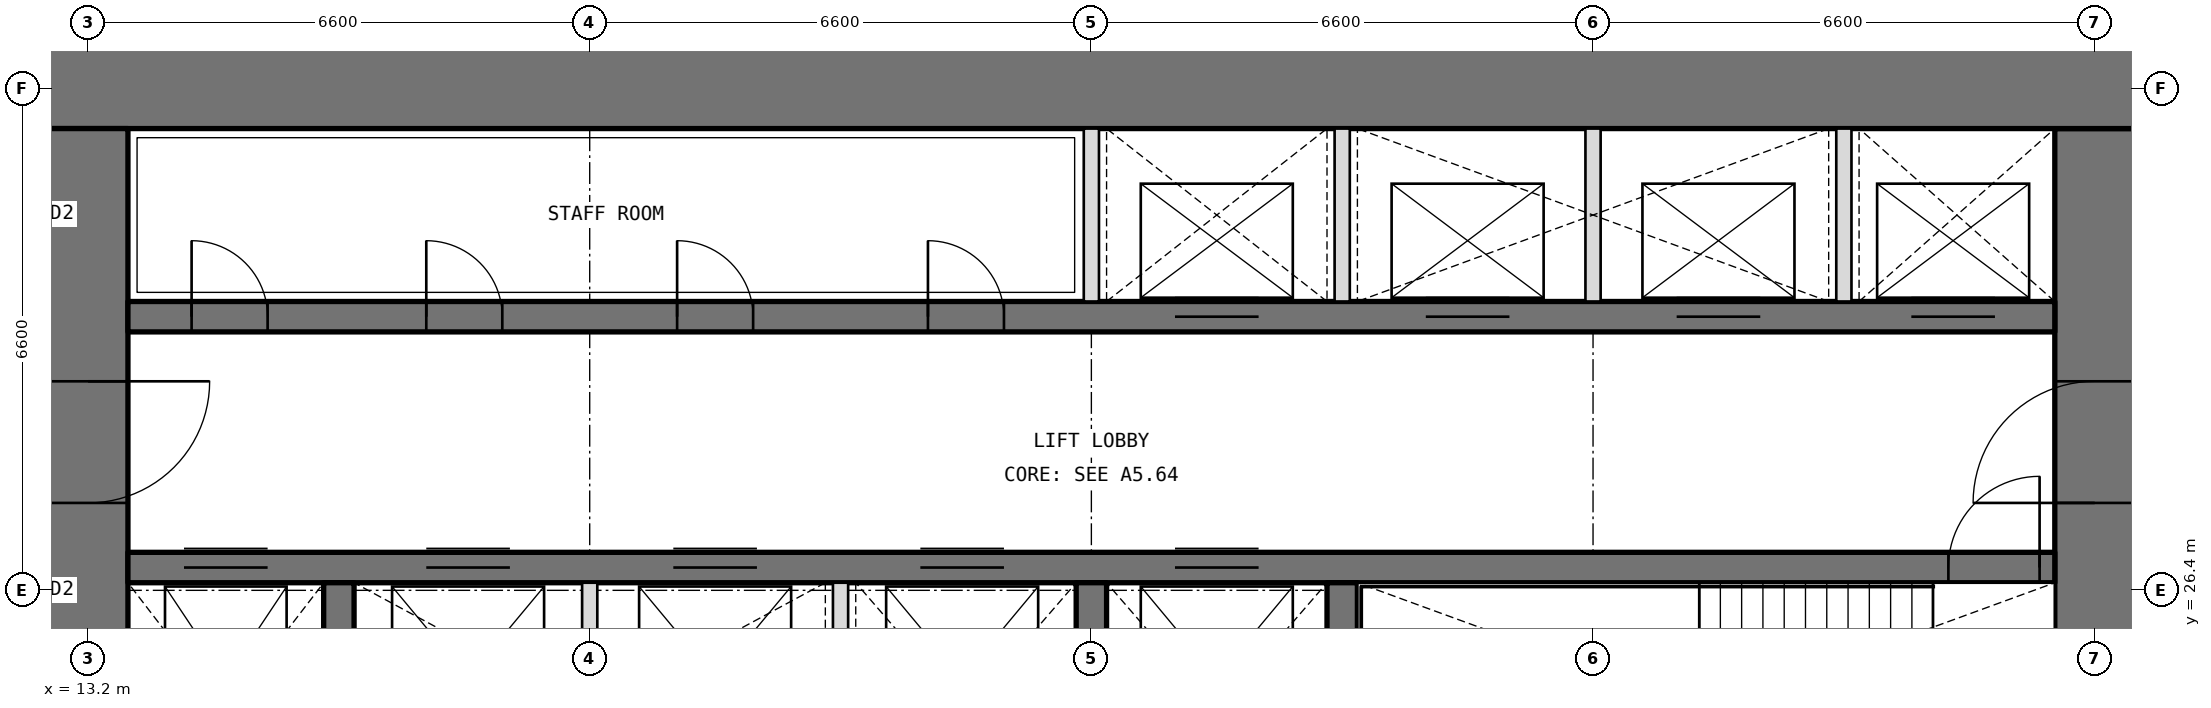
"""IFC4 building model, lengths in metres.
Left out: names, types, materials, properties, quantities, classifications, styles, units other than length and angle.
Written with IfcOpenShell. Run it as: python <this file> out.ifc"""

import sys

from ifc_helpers import new_model, si_unit, direction, frame, frame_2d, origin, place, context, subcontext, project, spatial, rectangle, extrude, element, fill, save


model = new_model("IFC4")
c1 = context("Model", 3, precision=1e-05, world=origin(), true_north=direction((0.0, 1.0)))
c2 = subcontext(c1, "Body", "Model", "MODEL_VIEW")
j1 = project(units=[si_unit("LENGTHUNIT", "METRE"), si_unit("PLANEANGLEUNIT", "RADIAN")], contexts=[c1])
p1 = place(None, origin())
s1 = spatial("IfcSite", under=j1, at=p1, CompositionType="ELEMENT")
p2 = place(p1, origin())
s2 = spatial("IfcBuilding", under=s1, at=p2, CompositionType="ELEMENT")
p3 = place(p2, frame((0.0, 0.0, 271.2)))
s3 = spatial("IfcBuildingStorey", under=s2, at=p3, CompositionType="ELEMENT", Elevation=271.2)
p4 = place(p3, frame((39.6, 13.725, 0.0), z_axis=(0.0, 0.0, 1.0), x_axis=(0.0, 1.0, 0.0)))
e1 = element("IfcWall", 1, at=p4, inside=s3, PredefinedType="SHEAR", context=c2, shape_type="SweptSolid", body=[
    extrude(rectangle(XDim=18.75, YDim=1.05, at=frame_2d((9.375, 0.0))), origin(), (0.0, 0.0, 1.0), 4.2),
])
p5 = place(p4, frame((3.025, 0.0, 0.0)))
e2 = element("IfcOpeningElement", 2, at=p5, cuts=e1, PredefinedType="OPENING", context=c2, shape_type="SweptSolid", body=[
    extrude(rectangle(XDim=1.6, YDim=2.1, at=frame_2d((0.8, 1.05))), frame((0.0, 0.535, 0.0), z_axis=(0.0, -1.0, 0.0), x_axis=(1.0, 0.0, 0.0)), (0.0, 0.0, 1.0), 1.07),
])
p6 = place(p4, frame((13.825, 0.0, 0.0)))
e3 = element("IfcOpeningElement", 3, at=p6, cuts=e1, PredefinedType="OPENING", context=c2, shape_type="SweptSolid", body=[
    extrude(rectangle(XDim=1.6, YDim=2.1, at=frame_2d((0.8, 1.05))), frame((0.0, 0.535, 0.0), z_axis=(0.0, -1.0, 0.0), x_axis=(1.0, 0.0, 0.0)), (0.0, 0.0, 1.0), 1.07),
])
p7 = place(p3, frame((40.125, 33.0, 0.0), z_axis=(0.0, 0.0, 1.0), x_axis=(-1.0, 0.0, 0.0)))
e4 = element("IfcWall", 4, at=p7, inside=s3, PredefinedType="SHEAR", context=c2, shape_type="SweptSolid", body=[
    extrude(rectangle(XDim=27.45, YDim=1.05, at=frame_2d((13.725, 0.0))), origin(), (0.0, 0.0, 1.0), 4.2),
])
p8 = place(p3, frame((13.2, 32.475, 0.0), z_axis=(0.0, 0.0, 1.0), x_axis=(0.0, -1.0, 0.0)))
e5 = element("IfcWall", 5, at=p8, inside=s3, PredefinedType="SHEAR", context=c2, shape_type="SweptSolid", body=[
    extrude(rectangle(XDim=18.75, YDim=1.05, at=frame_2d((9.375, 0.0))), origin(), (0.0, 0.0, 1.0), 4.2),
])
p9 = place(p8, frame((14.125, 0.0, 0.0)))
e6 = element("IfcOpeningElement", 6, at=p9, cuts=e5, PredefinedType="OPENING", context=c2, shape_type="SweptSolid", body=[
    extrude(rectangle(XDim=1.6, YDim=2.1, at=frame_2d((0.8, 1.05))), frame((0.0, 0.535, 0.0), z_axis=(0.0, -1.0, 0.0), x_axis=(1.0, 0.0, 0.0)), (0.0, 0.0, 1.0), 1.07),
])
p10 = place(p8, frame((3.325, 0.0, 0.0)))
e7 = element("IfcOpeningElement", 7, at=p10, cuts=e5, PredefinedType="OPENING", context=c2, shape_type="SweptSolid", body=[
    extrude(rectangle(XDim=1.6, YDim=2.1, at=frame_2d((0.8, 1.05))), frame((0.0, 0.535, 0.0), z_axis=(0.0, -1.0, 0.0), x_axis=(1.0, 0.0, 0.0)), (0.0, 0.0, 1.0), 1.07),
])
p11 = place(p3, frame((13.725, 26.7, 0.0), z_axis=(0.0, 0.0, 1.0), x_axis=(1.0, 0.0, 0.0)))
e8 = element("IfcWall", 8, at=p11, inside=s3, PredefinedType="SHEAR", context=c2, shape_type="SweptSolid", body=[
    extrude(rectangle(XDim=25.35, YDim=0.4, at=frame_2d((12.675, 0.0))), origin(), (0.0, 0.0, 1.0), 4.2),
])
p12 = place(p11, frame((23.95, 0.0, 0.0)))
e9 = element("IfcOpeningElement", 9, at=p12, cuts=e8, PredefinedType="OPENING", context=c2, shape_type="SweptSolid", body=[
    extrude(rectangle(XDim=1.2, YDim=2.1, at=frame_2d((0.6, 1.05))), frame((0.0, 0.21, 0.0), z_axis=(0.0, -1.0, 0.0), x_axis=(1.0, 0.0, 0.0)), (0.0, 0.0, 1.0), 0.42),
])
p13 = place(p11, frame((0.738, 0.0, 0.0)))
e10 = element("IfcOpeningElement", 10, at=p13, cuts=e8, PredefinedType="OPENING", context=c2, shape_type="SweptSolid", body=[
    extrude(rectangle(XDim=1.1, YDim=2.1, at=frame_2d((0.55, 1.05))), frame((0.0, 0.21, 0.0), z_axis=(0.0, -1.0, 0.0), x_axis=(1.0, 0.0, 0.0)), (0.0, 0.0, 1.0), 0.42),
])
p14 = place(p11, frame((3.925, 0.0, 0.0)))
e11 = element("IfcOpeningElement", 11, at=p14, cuts=e8, PredefinedType="OPENING", context=c2, shape_type="SweptSolid", body=[
    extrude(rectangle(XDim=1.1, YDim=2.1, at=frame_2d((0.55, 1.05))), frame((0.0, 0.21, 0.0), z_axis=(0.0, -1.0, 0.0), x_axis=(1.0, 0.0, 0.0)), (0.0, 0.0, 1.0), 0.42),
])
p15 = place(p11, frame((7.175, 0.0, 0.0)))
e12 = element("IfcOpeningElement", 12, at=p15, cuts=e8, PredefinedType="OPENING", context=c2, shape_type="SweptSolid", body=[
    extrude(rectangle(XDim=1.1, YDim=2.1, at=frame_2d((0.55, 1.05))), frame((0.0, 0.21, 0.0), z_axis=(0.0, -1.0, 0.0), x_axis=(1.0, 0.0, 0.0)), (0.0, 0.0, 1.0), 0.42),
])
p16 = place(p11, frame((10.425, 0.0, 0.0)))
e13 = element("IfcOpeningElement", 13, at=p16, cuts=e8, PredefinedType="OPENING", context=c2, shape_type="SweptSolid", body=[
    extrude(rectangle(XDim=1.1, YDim=2.1, at=frame_2d((0.55, 1.05))), frame((0.0, 0.21, 0.0), z_axis=(0.0, -1.0, 0.0), x_axis=(1.0, 0.0, 0.0)), (0.0, 0.0, 1.0), 0.42),
])
p17 = place(p11, frame((13.775, 0.0, 0.0)))
e14 = element("IfcOpeningElement", 14, at=p17, cuts=e8, PredefinedType="OPENING", context=c2, shape_type="SweptSolid", body=[
    extrude(rectangle(XDim=1.1, YDim=2.1, at=frame_2d((0.55, 1.05))), frame((0.0, 0.21, 0.0), z_axis=(0.0, -1.0, 0.0), x_axis=(1.0, 0.0, 0.0)), (0.0, 0.0, 1.0), 0.42),
])
p18 = place(p3, frame((13.725, 30.0, 0.0), z_axis=(0.0, 0.0, 1.0), x_axis=(1.0, 0.0, 0.0)))
e15 = element("IfcWall", 15, at=p18, inside=s3, PredefinedType="SHEAR", context=c2, shape_type="SweptSolid", body=[
    extrude(rectangle(XDim=25.35, YDim=0.4, at=frame_2d((12.675, 0.0))), origin(), (0.0, 0.0, 1.0), 4.2),
])
p19 = place(p18, frame((0.837, 0.0, 0.0)))
e16 = element("IfcOpeningElement", 16, at=p19, cuts=e15, PredefinedType="OPENING", context=c2, shape_type="SweptSolid", body=[
    extrude(rectangle(XDim=1.0, YDim=2.1, at=frame_2d((0.5, 1.05))), frame((0.0, 0.21, 0.0), z_axis=(0.0, -1.0, 0.0), x_axis=(1.0, 0.0, 0.0)), (0.0, 0.0, 1.0), 0.42),
])
p20 = place(p18, frame((3.925, 0.0, 0.0)))
e17 = element("IfcOpeningElement", 17, at=p20, cuts=e15, PredefinedType="OPENING", context=c2, shape_type="SweptSolid", body=[
    extrude(rectangle(XDim=1.0, YDim=2.1, at=frame_2d((0.5, 1.05))), frame((0.0, 0.21, 0.0), z_axis=(0.0, -1.0, 0.0), x_axis=(1.0, 0.0, 0.0)), (0.0, 0.0, 1.0), 0.42),
])
p21 = place(p18, frame((7.225, 0.0, 0.0)))
e18 = element("IfcOpeningElement", 18, at=p21, cuts=e15, PredefinedType="OPENING", context=c2, shape_type="SweptSolid", body=[
    extrude(rectangle(XDim=1.0, YDim=2.1, at=frame_2d((0.5, 1.05))), frame((0.0, 0.21, 0.0), z_axis=(0.0, -1.0, 0.0), x_axis=(1.0, 0.0, 0.0)), (0.0, 0.0, 1.0), 0.42),
])
p22 = place(p18, frame((10.525, 0.0, 0.0)))
e19 = element("IfcOpeningElement", 19, at=p22, cuts=e15, PredefinedType="OPENING", context=c2, shape_type="SweptSolid", body=[
    extrude(rectangle(XDim=1.0, YDim=2.1, at=frame_2d((0.5, 1.05))), frame((0.0, 0.21, 0.0), z_axis=(0.0, -1.0, 0.0), x_axis=(1.0, 0.0, 0.0)), (0.0, 0.0, 1.0), 0.42),
])
p23 = place(p18, frame((13.775, 0.0, 0.0)))
e20 = element("IfcOpeningElement", 20, at=p23, cuts=e15, PredefinedType="OPENING", context=c2, shape_type="SweptSolid", body=[
    extrude(rectangle(XDim=1.1, YDim=2.1, at=frame_2d((0.55, 1.05))), frame((0.0, 0.21, 0.0), z_axis=(0.0, -1.0, 0.0), x_axis=(1.0, 0.0, 0.0)), (0.0, 0.0, 1.0), 0.42),
])
p24 = place(p18, frame((17.075, 0.0, 0.0)))
e21 = element("IfcOpeningElement", 21, at=p24, cuts=e15, PredefinedType="OPENING", context=c2, shape_type="SweptSolid", body=[
    extrude(rectangle(XDim=1.1, YDim=2.1, at=frame_2d((0.55, 1.05))), frame((0.0, 0.21, 0.0), z_axis=(0.0, -1.0, 0.0), x_axis=(1.0, 0.0, 0.0)), (0.0, 0.0, 1.0), 0.42),
])
p25 = place(p18, frame((20.375, 0.0, 0.0)))
e22 = element("IfcOpeningElement", 22, at=p25, cuts=e15, PredefinedType="OPENING", context=c2, shape_type="SweptSolid", body=[
    extrude(rectangle(XDim=1.1, YDim=2.1, at=frame_2d((0.55, 1.05))), frame((0.0, 0.21, 0.0), z_axis=(0.0, -1.0, 0.0), x_axis=(1.0, 0.0, 0.0)), (0.0, 0.0, 1.0), 0.42),
])
p26 = place(p18, frame((23.462, 0.0, 0.0)))
e23 = element("IfcOpeningElement", 23, at=p26, cuts=e15, PredefinedType="OPENING", context=c2, shape_type="SweptSolid", body=[
    extrude(rectangle(XDim=1.1, YDim=2.1, at=frame_2d((0.55, 1.05))), frame((0.0, 0.21, 0.0), z_axis=(0.0, -1.0, 0.0), x_axis=(1.0, 0.0, 0.0)), (0.0, 0.0, 1.0), 0.42),
])
for number, where, z_axis, x_axis in (
    (24, (16.5, 23.15, 0.0), (0.0, 0.0, 1.0), (0.0, 1.0, 0.0)),
    (25, (26.4, 23.15, 0.0), (0.0, 0.0, 1.0), (0.0, 1.0, 0.0)),
    (26, (29.7, 23.15, 0.0), (0.0, 0.0, 1.0), (0.0, 1.0, 0.0)),
):
    element("IfcWall", number, at=place(p3, frame(where, z_axis=z_axis, x_axis=x_axis)), inside=s3, PredefinedType="SHEAR", context=c2, shape_type="SweptSolid", body=[
        extrude(rectangle(XDim=3.35, YDim=0.4, at=frame_2d((1.675, 0.0))), origin(), (0.0, 0.0, 1.0), 4.2),
    ])
for number, where, z_axis, x_axis in (
    (27, (26.4, 30.2, 0.0), (0.0, 0.0, 1.0), (0.0, 1.0, 0.0)),
    (28, (29.7, 30.2, 0.0), (0.0, 0.0, 1.0), (0.0, 1.0, 0.0)),
    (29, (33.0, 30.2, 0.0), (0.0, 0.0, 1.0), (0.0, 1.0, 0.0)),
    (30, (36.3, 30.2, 0.0), (0.0, 0.0, 1.0), (0.0, 1.0, 0.0)),
):
    element("IfcWall", number, at=place(p3, frame(where, z_axis=z_axis, x_axis=x_axis)), inside=s3, PredefinedType="PARTITIONING", context=c2, shape_type="SweptSolid", body=[
        extrude(rectangle(XDim=2.275, YDim=0.2, at=frame_2d((1.138, 0.0))), origin(), (0.0, 0.0, 1.0), 4.2),
    ])
for number, where, z_axis, x_axis in (
    (31, (19.8, 23.15, 0.0), (0.0, 0.0, 1.0), (0.0, 1.0, 0.0)),
    (32, (23.1, 23.15, 0.0), (0.0, 0.0, 1.0), (0.0, 1.0, 0.0)),
):
    element("IfcWall", number, at=place(p3, frame(where, z_axis=z_axis, x_axis=x_axis)), inside=s3, PredefinedType="PARTITIONING", context=c2, shape_type="SweptSolid", body=[
        extrude(rectangle(XDim=3.35, YDim=0.2, at=frame_2d((1.675, 0.0))), origin(), (0.0, 0.0, 1.0), 4.2),
    ])
p27 = place(p19, origin())
e33 = element("IfcDoor", 33, at=p27, inside=s3, OperationType="SINGLE_SWING_LEFT", PredefinedType="DOOR", context=c2, shape_type="SweptSolid", body=[
    extrude(rectangle(XDim=1.0, YDim=2.1, at=frame_2d((0.5, 1.05))), frame((0.0, 0.025, 0.0), z_axis=(0.0, -1.0, 0.0), x_axis=(1.0, 0.0, 0.0)), (0.0, 0.0, 1.0), 0.05),
])
fill(e16, e33)
p28 = place(p20, origin())
e34 = element("IfcDoor", 34, at=p28, inside=s3, OperationType="SINGLE_SWING_LEFT", PredefinedType="DOOR", context=c2, shape_type="SweptSolid", body=[
    extrude(rectangle(XDim=1.0, YDim=2.1, at=frame_2d((0.5, 1.05))), frame((0.0, 0.025, 0.0), z_axis=(0.0, -1.0, 0.0), x_axis=(1.0, 0.0, 0.0)), (0.0, 0.0, 1.0), 0.05),
])
fill(e17, e34)
p29 = place(p21, origin())
e35 = element("IfcDoor", 35, at=p29, inside=s3, OperationType="SINGLE_SWING_LEFT", PredefinedType="DOOR", context=c2, shape_type="SweptSolid", body=[
    extrude(rectangle(XDim=1.0, YDim=2.1, at=frame_2d((0.5, 1.05))), frame((0.0, 0.025, 0.0), z_axis=(0.0, -1.0, 0.0), x_axis=(1.0, 0.0, 0.0)), (0.0, 0.0, 1.0), 0.05),
])
fill(e18, e35)
p30 = place(p22, origin())
e36 = element("IfcDoor", 36, at=p30, inside=s3, OperationType="SINGLE_SWING_LEFT", PredefinedType="DOOR", context=c2, shape_type="SweptSolid", body=[
    extrude(rectangle(XDim=1.0, YDim=2.1, at=frame_2d((0.5, 1.05))), frame((0.0, 0.025, 0.0), z_axis=(0.0, -1.0, 0.0), x_axis=(1.0, 0.0, 0.0)), (0.0, 0.0, 1.0), 0.05),
])
fill(e19, e36)
p31 = place(p12, origin())
e37 = element("IfcDoor", 37, at=p31, inside=s3, OperationType="SINGLE_SWING_RIGHT", PredefinedType="DOOR", context=c2, shape_type="SweptSolid", body=[
    extrude(rectangle(XDim=1.2, YDim=2.1, at=frame_2d((0.6, 1.05))), frame((0.0, 0.025, 0.0), z_axis=(0.0, -1.0, 0.0), x_axis=(1.0, 0.0, 0.0)), (0.0, 0.0, 1.0), 0.05),
])
fill(e9, e37)
p32 = place(p10, origin())
e38 = element("IfcDoor", 38, at=p32, inside=s3, OperationType="DOUBLE_DOOR_DOUBLE_SWING", PredefinedType="DOOR", context=c2, shape_type="SweptSolid", body=[
    extrude(rectangle(XDim=1.6, YDim=2.1, at=frame_2d((0.8, 1.05))), frame((0.0, 0.025, 0.0), z_axis=(0.0, -1.0, 0.0), x_axis=(1.0, 0.0, 0.0)), (0.0, 0.0, 1.0), 0.05),
])
fill(e7, e38)
p33 = place(p6, origin())
e39 = element("IfcDoor", 39, at=p33, inside=s3, OperationType="DOUBLE_DOOR_DOUBLE_SWING", PredefinedType="DOOR", context=c2, shape_type="SweptSolid", body=[
    extrude(rectangle(XDim=1.6, YDim=2.1, at=frame_2d((0.8, 1.05))), frame((0.0, 0.025, 0.0), z_axis=(0.0, -1.0, 0.0), x_axis=(1.0, 0.0, 0.0)), (0.0, 0.0, 1.0), 0.05),
])
fill(e3, e39)
p34 = place(p23, origin())
e40 = element("IfcDoor", 40, at=p34, inside=s3, OperationType="DOUBLE_DOOR_SLIDING", PredefinedType="DOOR", context=c2, shape_type="SweptSolid", body=[
    extrude(rectangle(XDim=1.1, YDim=2.1, at=frame_2d((0.55, 1.05))), frame((0.0, 0.025, 0.0), z_axis=(0.0, -1.0, 0.0), x_axis=(1.0, 0.0, 0.0)), (0.0, 0.0, 1.0), 0.05),
])
fill(e20, e40)
p35 = place(p24, origin())
e41 = element("IfcDoor", 41, at=p35, inside=s3, OperationType="DOUBLE_DOOR_SLIDING", PredefinedType="DOOR", context=c2, shape_type="SweptSolid", body=[
    extrude(rectangle(XDim=1.1, YDim=2.1, at=frame_2d((0.55, 1.05))), frame((0.0, 0.025, 0.0), z_axis=(0.0, -1.0, 0.0), x_axis=(1.0, 0.0, 0.0)), (0.0, 0.0, 1.0), 0.05),
])
fill(e21, e41)
p36 = place(p25, origin())
e42 = element("IfcDoor", 42, at=p36, inside=s3, OperationType="DOUBLE_DOOR_SLIDING", PredefinedType="DOOR", context=c2, shape_type="SweptSolid", body=[
    extrude(rectangle(XDim=1.1, YDim=2.1, at=frame_2d((0.55, 1.05))), frame((0.0, 0.025, 0.0), z_axis=(0.0, -1.0, 0.0), x_axis=(1.0, 0.0, 0.0)), (0.0, 0.0, 1.0), 0.05),
])
fill(e22, e42)
p37 = place(p26, origin())
e43 = element("IfcDoor", 43, at=p37, inside=s3, OperationType="DOUBLE_DOOR_SLIDING", PredefinedType="DOOR", context=c2, shape_type="SweptSolid", body=[
    extrude(rectangle(XDim=1.1, YDim=2.1, at=frame_2d((0.55, 1.05))), frame((0.0, 0.025, 0.0), z_axis=(0.0, -1.0, 0.0), x_axis=(1.0, 0.0, 0.0)), (0.0, 0.0, 1.0), 0.05),
])
fill(e23, e43)
p38 = place(p13, origin())
e44 = element("IfcDoor", 44, at=p38, inside=s3, OperationType="DOUBLE_DOOR_SLIDING", PredefinedType="DOOR", context=c2, shape_type="SweptSolid", body=[
    extrude(rectangle(XDim=1.1, YDim=2.1, at=frame_2d((0.55, 1.05))), frame((0.0, 0.025, 0.0), z_axis=(0.0, -1.0, 0.0), x_axis=(1.0, 0.0, 0.0)), (0.0, 0.0, 1.0), 0.05),
])
fill(e10, e44)
p39 = place(p14, origin())
e45 = element("IfcDoor", 45, at=p39, inside=s3, OperationType="DOUBLE_DOOR_SLIDING", PredefinedType="DOOR", context=c2, shape_type="SweptSolid", body=[
    extrude(rectangle(XDim=1.1, YDim=2.1, at=frame_2d((0.55, 1.05))), frame((0.0, 0.025, 0.0), z_axis=(0.0, -1.0, 0.0), x_axis=(1.0, 0.0, 0.0)), (0.0, 0.0, 1.0), 0.05),
])
fill(e11, e45)
p40 = place(p15, origin())
e46 = element("IfcDoor", 46, at=p40, inside=s3, OperationType="DOUBLE_DOOR_SLIDING", PredefinedType="DOOR", context=c2, shape_type="SweptSolid", body=[
    extrude(rectangle(XDim=1.1, YDim=2.1, at=frame_2d((0.55, 1.05))), frame((0.0, 0.025, 0.0), z_axis=(0.0, -1.0, 0.0), x_axis=(1.0, 0.0, 0.0)), (0.0, 0.0, 1.0), 0.05),
])
fill(e12, e46)
p41 = place(p16, origin())
e47 = element("IfcDoor", 47, at=p41, inside=s3, OperationType="DOUBLE_DOOR_SLIDING", PredefinedType="DOOR", context=c2, shape_type="SweptSolid", body=[
    extrude(rectangle(XDim=1.1, YDim=2.1, at=frame_2d((0.55, 1.05))), frame((0.0, 0.025, 0.0), z_axis=(0.0, -1.0, 0.0), x_axis=(1.0, 0.0, 0.0)), (0.0, 0.0, 1.0), 0.05),
])
fill(e13, e47)
p42 = place(p17, origin())
e48 = element("IfcDoor", 48, at=p42, inside=s3, OperationType="DOUBLE_DOOR_SLIDING", PredefinedType="DOOR", context=c2, shape_type="SweptSolid", body=[
    extrude(rectangle(XDim=1.1, YDim=2.1, at=frame_2d((0.55, 1.05))), frame((0.0, 0.025, 0.0), z_axis=(0.0, -1.0, 0.0), x_axis=(1.0, 0.0, 0.0)), (0.0, 0.0, 1.0), 0.05),
])
fill(e14, e48)
save(model, sys.argv[1])
